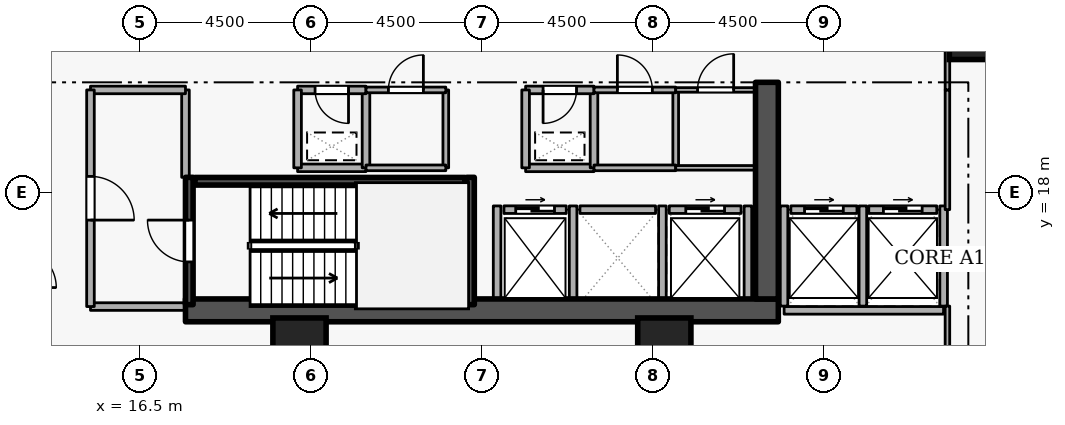
"""IFC4 building model, lengths in metres.
Left out: names, types, materials, properties, quantities, classifications, styles, units other than length and angle.
Written with IfcOpenShell. Run it as: python <this file> out.ifc"""

import sys

from ifc_helpers import new_model, si_unit, direction, frame, frame_2d, origin, origin_2d, place, context, subcontext, project, spatial, rectangle, extrude, element, fill, save


model = new_model("IFC4")
c1 = context("Model", 3, precision=1e-05, world=origin(), true_north=direction((0.0, 1.0)))
c2 = subcontext(c1, "Body", "Model", "MODEL_VIEW")
j1 = project(units=[si_unit("LENGTHUNIT", "METRE"), si_unit("PLANEANGLEUNIT", "RADIAN")], contexts=[c1])
p1 = place(None, origin())
s1 = spatial("IfcSite", under=j1, at=p1, CompositionType="ELEMENT")
p2 = place(p1, origin())
s2 = spatial("IfcBuilding", under=s1, at=p2, CompositionType="ELEMENT")
p3 = place(p2, frame((0.0, 0.0, 38.7)))
s3 = spatial("IfcBuildingStorey", under=s2, at=p3, CompositionType="ELEMENT", Elevation=38.7)
p4 = place(p3, frame((17.7, 14.9, 0.0), z_axis=(0.0, 0.0, 1.0), x_axis=(1.0, 0.0, 0.0)))
e1 = element("IfcWall", 1, at=p4, inside=s3, PredefinedType="SHEAR", context=c2, shape_type="SweptSolid", body=[
    extrude(rectangle(XDim=15.6, YDim=0.6, at=frame_2d((7.8, 0.0))), origin(), (0.0, 0.0, 1.0), 3.6),
])
p5 = place(p3, frame((33.0, 15.2, 0.0), z_axis=(0.0, 0.0, 1.0), x_axis=(0.0, 1.0, 0.0)))
e2 = element("IfcWall", 2, at=p5, inside=s3, PredefinedType="SHEAR", context=c2, shape_type="SweptSolid", body=[
    extrude(rectangle(XDim=5.7, YDim=0.6, at=frame_2d((2.85, 0.0))), origin(), (0.0, 0.0, 1.0), 3.6),
])
for number, where, z_axis, x_axis in (
    (3, (38.5, 22.2, 0.0), (0.0, 0.0, 1.0), (1.0, 0.0, 0.0)),
    (4, (20.7, 14.0, 0.0), (0.0, 0.0, 1.0), (1.0, 0.0, 0.0)),
    (5, (30.3, 14.0, 0.0), (0.0, 0.0, 1.0), (1.0, 0.0, 0.0)),
):
    element("IfcColumn", number, at=place(p3, frame(where, z_axis=z_axis, x_axis=x_axis)), inside=s3, PredefinedType="COLUMN", context=c2, shape_type="SweptSolid", body=[
        extrude(rectangle(XDim=1.4, YDim=1.4, at=origin_2d()), origin(), (0.0, 0.0, 1.0), 3.6),
    ])
p6 = place(p3, frame((26.08, 17.55, 0.0), z_axis=(0.0, 0.0, 1.0), x_axis=(1.0, 0.0, 0.0)))
e6 = element("IfcWall", 6, at=p6, inside=s3, PredefinedType="STANDARD", context=c2, shape_type="SweptSolid", body=[
    extrude(rectangle(XDim=1.64, YDim=0.2, at=frame_2d((0.82, 0.0))), origin(), (0.0, 0.0, 1.0), 3.34),
])
p7 = place(p6, frame((0.31, 0.0, 0.0)))
e7 = element("IfcOpeningElement", 7, at=p7, cuts=e6, PredefinedType="OPENING", context=c2, shape_type="SweptSolid", body=[
    extrude(rectangle(XDim=1.02, YDim=2.06, at=frame_2d((0.51, 1.03))), frame((0.0, 0.11, 0.0), z_axis=(0.0, -1.0, 0.0), x_axis=(1.0, 0.0, 0.0)), (0.0, 0.0, 1.0), 0.22),
])
p8 = place(p3, frame((28.08, 17.55, 0.0), z_axis=(0.0, 0.0, 1.0), x_axis=(1.0, 0.0, 0.0)))
e8 = element("IfcWall", 8, at=p8, inside=s3, PredefinedType="STANDARD", context=c2, shape_type="SweptSolid", body=[
    extrude(rectangle(XDim=1.99, YDim=0.2, at=frame_2d((0.995, 0.0))), origin(), (0.0, 0.0, 1.0), 3.34),
])
p9 = place(p3, frame((30.43, 17.55, 0.0), z_axis=(0.0, 0.0, 1.0), x_axis=(1.0, 0.0, 0.0)))
e9 = element("IfcWall", 9, at=p9, inside=s3, PredefinedType="STANDARD", context=c2, shape_type="SweptSolid", body=[
    extrude(rectangle(XDim=1.89, YDim=0.2, at=frame_2d((0.945, 0.0))), origin(), (0.0, 0.0, 1.0), 3.34),
])
p10 = place(p9, frame((0.435, 0.0, 0.0)))
e10 = element("IfcOpeningElement", 10, at=p10, cuts=e9, PredefinedType="OPENING", context=c2, shape_type="SweptSolid", body=[
    extrude(rectangle(XDim=1.02, YDim=2.06, at=frame_2d((0.51, 1.03))), frame((0.0, 0.11, 0.0), z_axis=(0.0, -1.0, 0.0), x_axis=(1.0, 0.0, 0.0)), (0.0, 0.0, 1.0), 0.22),
])
p11 = place(p3, frame((33.63, 17.55, 0.0), z_axis=(0.0, 0.0, 1.0), x_axis=(1.0, 0.0, 0.0)))
e11 = element("IfcWall", 11, at=p11, inside=s3, PredefinedType="STANDARD", context=c2, shape_type="SweptSolid", body=[
    extrude(rectangle(XDim=1.74, YDim=0.2, at=frame_2d((0.87, 0.0))), origin(), (0.0, 0.0, 1.0), 3.34),
])
p12 = place(p11, frame((0.36, 0.0, 0.0)))
e12 = element("IfcOpeningElement", 12, at=p12, cuts=e11, PredefinedType="OPENING", context=c2, shape_type="SweptSolid", body=[
    extrude(rectangle(XDim=1.02, YDim=2.06, at=frame_2d((0.51, 1.03))), frame((0.0, 0.11, 0.0), z_axis=(0.0, -1.0, 0.0), x_axis=(1.0, 0.0, 0.0)), (0.0, 0.0, 1.0), 0.22),
])
p13 = place(p3, frame((35.68, 17.55, 0.0), z_axis=(0.0, 0.0, 1.0), x_axis=(1.0, 0.0, 0.0)))
e13 = element("IfcWall", 13, at=p13, inside=s3, PredefinedType="STANDARD", context=c2, shape_type="SweptSolid", body=[
    extrude(rectangle(XDim=1.79, YDim=0.2, at=frame_2d((0.895, 0.0))), origin(), (0.0, 0.0, 1.0), 3.34),
])
p14 = place(p13, frame((0.385, 0.0, 0.0)))
e14 = element("IfcOpeningElement", 14, at=p14, cuts=e13, PredefinedType="OPENING", context=c2, shape_type="SweptSolid", body=[
    extrude(rectangle(XDim=1.02, YDim=2.06, at=frame_2d((0.51, 1.03))), frame((0.0, 0.11, 0.0), z_axis=(0.0, -1.0, 0.0), x_axis=(1.0, 0.0, 0.0)), (0.0, 0.0, 1.0), 0.22),
])
for number, where, z_axis, x_axis in (
    (15, (27.9, 15.212, 0.0), (0.0, 0.0, 1.0), (0.0, 1.0, 0.0)),
    (16, (25.9, 15.212, 0.0), (0.0, 0.0, 1.0), (0.0, 1.0, 0.0)),
    (17, (30.25, 15.212, 0.0), (0.0, 0.0, 1.0), (0.0, 1.0, 0.0)),
    (18, (32.5, 15.212, 0.0), (0.0, 0.0, 1.0), (0.0, 1.0, 0.0)),
):
    element("IfcWall", number, at=place(p3, frame(where, z_axis=z_axis, x_axis=x_axis)), inside=s3, PredefinedType="STANDARD", context=c2, shape_type="SweptSolid", body=[
        extrude(rectangle(XDim=2.436, YDim=0.2, at=frame_2d((1.218, 0.0))), origin(), (0.0, 0.0, 1.0), 3.34),
    ])
p15 = place(p3, frame((33.452, 14.9, 0.0), z_axis=(0.0, 0.0, 1.0), x_axis=(1.0, 0.0, 0.0)))
e19 = element("IfcWall", 19, at=p15, inside=s3, PredefinedType="STANDARD", context=c2, shape_type="SweptSolid", body=[
    extrude(rectangle(XDim=4.196, YDim=0.2, at=frame_2d((2.098, 0.0))), origin(), (0.0, 0.0, 1.0), 3.34),
])
for number, where, z_axis, x_axis in (
    (20, (35.525, 15.012, 0.0), (0.0, 0.0, 1.0), (0.0, 1.0, 0.0)),
    (21, (33.45, 15.012, 0.0), (0.0, 0.0, 1.0), (0.0, 1.0, 0.0)),
    (22, (37.65, 15.012, 0.0), (0.0, 0.0, 1.0), (0.0, 1.0, 0.0)),
):
    element("IfcWall", number, at=place(p3, frame(where, z_axis=z_axis, x_axis=x_axis)), inside=s3, PredefinedType="STANDARD", context=c2, shape_type="SweptSolid", body=[
        extrude(rectangle(XDim=2.636, YDim=0.2, at=frame_2d((1.318, 0.0))), origin(), (0.0, 0.0, 1.0), 3.34),
    ])
p16 = place(p3, frame((17.8, 15.05, 0.0), z_axis=(0.0, 0.0, 1.0), x_axis=(0.0, 1.0, 0.0)))
e23 = element("IfcWall", 23, at=p16, inside=s3, PredefinedType="SHEAR", context=c2, shape_type="SweptSolid", body=[
    extrude(rectangle(XDim=3.35, YDim=0.2, at=frame_2d((1.675, 0.0))), origin(), (0.0, 0.0, 1.0), 3.6),
])
p17 = place(p16, frame((1.125, 0.0, 0.0)))
e24 = element("IfcOpeningElement", 24, at=p17, cuts=e23, PredefinedType="OPENING", context=c2, shape_type="SweptSolid", body=[
    extrude(rectangle(XDim=1.1, YDim=2.1, at=frame_2d((0.55, 1.05))), frame((0.0, 0.11, 0.0), z_axis=(0.0, -1.0, 0.0), x_axis=(1.0, 0.0, 0.0)), (0.0, 0.0, 1.0), 0.22),
])
p18 = place(p3, frame((25.2, 18.4, 0.0), z_axis=(0.0, 0.0, 1.0), x_axis=(0.0, -1.0, 0.0)))
e25 = element("IfcWall", 25, at=p18, inside=s3, PredefinedType="SHEAR", context=c2, shape_type="SweptSolid", body=[
    extrude(rectangle(XDim=3.35, YDim=0.2, at=frame_2d((1.675, 0.0))), origin(), (0.0, 0.0, 1.0), 3.6),
])
p19 = place(p3, frame((25.05, 18.297, 0.0), z_axis=(0.0, 0.0, 1.0), x_axis=(-1.0, 0.0, 0.0)))
e26 = element("IfcWall", 26, at=p19, inside=s3, PredefinedType="SHEAR", context=c2, shape_type="SweptSolid", body=[
    extrude(rectangle(XDim=7.1, YDim=0.2, at=frame_2d((3.55, 0.0))), origin(), (0.0, 0.0, 1.0), 3.6),
])
p20 = place(p3, frame((15.2, 15.0, 0.0), z_axis=(0.0, 0.0, 1.0), x_axis=(1.0, 0.0, 0.0)))
e27 = element("IfcWall", 27, at=p20, inside=s3, PredefinedType="STANDARD", context=c2, shape_type="SweptSolid", body=[
    extrude(rectangle(XDim=2.5, YDim=0.2, at=frame_2d((1.25, 0.0))), origin(), (0.0, 0.0, 1.0), 3.34),
])
p21 = place(p3, frame((17.7, 18.4, 0.0), z_axis=(0.0, 0.0, 1.0), x_axis=(0.0, 1.0, 0.0)))
e28 = element("IfcWall", 28, at=p21, inside=s3, PredefinedType="STANDARD", context=c2, shape_type="SweptSolid", body=[
    extrude(rectangle(XDim=2.3, YDim=0.2, at=frame_2d((1.15, 0.0))), origin(), (0.0, 0.0, 1.0), 2.545),
])
p22 = place(p3, frame((17.7, 20.7, 0.0), z_axis=(0.0, 0.0, 1.0), x_axis=(-1.0, 0.0, 0.0)))
e29 = element("IfcWall", 29, at=p22, inside=s3, PredefinedType="STANDARD", context=c2, shape_type="SweptSolid", body=[
    extrude(rectangle(XDim=2.5, YDim=0.2, at=frame_2d((1.25, 0.0))), origin(), (0.0, 0.0, 1.0), 3.34),
])
p23 = place(p3, frame((15.2, 20.7, 0.0), z_axis=(0.0, 0.0, 1.0), x_axis=(0.0, -1.0, 0.0)))
e30 = element("IfcWall", 30, at=p23, inside=s3, PredefinedType="STANDARD", context=c2, shape_type="SweptSolid", body=[
    extrude(rectangle(XDim=5.7, YDim=0.2, at=frame_2d((2.85, 0.0))), origin(), (0.0, 0.0, 1.0), 3.34),
])
p24 = place(p23, frame((2.275, 0.0, 0.0)))
e31 = element("IfcOpeningElement", 31, at=p24, cuts=e30, PredefinedType="OPENING", context=c2, shape_type="SweptSolid", body=[
    extrude(rectangle(XDim=1.15, YDim=2.1, at=frame_2d((0.575, 1.05))), frame((0.0, 0.11, 0.0), z_axis=(0.0, -1.0, 0.0), x_axis=(1.0, 0.0, 0.0)), (0.0, 0.0, 1.0), 0.22),
])
p25 = place(p3, frame((26.65, 18.65, 0.0), z_axis=(0.0, 0.0, 1.0), x_axis=(1.0, 0.0, 0.0)))
e32 = element("IfcWall", 32, at=p25, inside=s3, PredefinedType="STANDARD", context=c2, shape_type="SweptSolid", body=[
    extrude(rectangle(XDim=1.8, YDim=0.2, at=frame_2d((0.9, 0.0))), origin(), (0.0, 0.0, 1.0), 3.34),
])
p26 = place(p3, frame((28.45, 18.65, 0.0), z_axis=(0.0, 0.0, 1.0), x_axis=(0.0, 1.0, 0.0)))
e33 = element("IfcWall", 33, at=p26, inside=s3, PredefinedType="STANDARD", context=c2, shape_type="SweptSolid", body=[
    extrude(rectangle(XDim=2.05, YDim=0.2, at=frame_2d((1.025, 0.0))), origin(), (0.0, 0.0, 1.0), 3.34),
])
p27 = place(p3, frame((28.45, 20.7, 0.0), z_axis=(0.0, 0.0, 1.0), x_axis=(-1.0, 0.0, 0.0)))
e34 = element("IfcWall", 34, at=p27, inside=s3, PredefinedType="STANDARD", context=c2, shape_type="SweptSolid", body=[
    extrude(rectangle(XDim=1.8, YDim=0.2, at=frame_2d((0.9, 0.0))), origin(), (0.0, 0.0, 1.0), 3.34),
])
p28 = place(p27, frame((0.46, 0.0, 0.0)))
e35 = element("IfcOpeningElement", 35, at=p28, cuts=e34, PredefinedType="OPENING", context=c2, shape_type="SweptSolid", body=[
    extrude(rectangle(XDim=0.88, YDim=2.04, at=frame_2d((0.44, 1.02))), frame((0.0, 0.11, 0.0), z_axis=(0.0, -1.0, 0.0), x_axis=(1.0, 0.0, 0.0)), (0.0, 0.0, 1.0), 0.22),
])
p29 = place(p3, frame((26.65, 20.7, 0.0), z_axis=(0.0, 0.0, 1.0), x_axis=(0.0, -1.0, 0.0)))
e36 = element("IfcWall", 36, at=p29, inside=s3, PredefinedType="STANDARD", context=c2, shape_type="SweptSolid", body=[
    extrude(rectangle(XDim=2.05, YDim=0.2, at=frame_2d((1.025, 0.0))), origin(), (0.0, 0.0, 1.0), 3.34),
])
p30 = place(p3, frame((20.65, 18.65, 0.0), z_axis=(0.0, 0.0, 1.0), x_axis=(1.0, 0.0, 0.0)))
e37 = element("IfcWall", 37, at=p30, inside=s3, PredefinedType="STANDARD", context=c2, shape_type="SweptSolid", body=[
    extrude(rectangle(XDim=1.8, YDim=0.2, at=frame_2d((0.9, 0.0))), origin(), (0.0, 0.0, 1.0), 3.34),
])
p31 = place(p3, frame((22.45, 18.65, 0.0), z_axis=(0.0, 0.0, 1.0), x_axis=(0.0, 1.0, 0.0)))
e38 = element("IfcWall", 38, at=p31, inside=s3, PredefinedType="STANDARD", context=c2, shape_type="SweptSolid", body=[
    extrude(rectangle(XDim=2.05, YDim=0.2, at=frame_2d((1.025, 0.0))), origin(), (0.0, 0.0, 1.0), 3.34),
])
p32 = place(p3, frame((22.45, 20.7, 0.0), z_axis=(0.0, 0.0, 1.0), x_axis=(-1.0, 0.0, 0.0)))
e39 = element("IfcWall", 39, at=p32, inside=s3, PredefinedType="STANDARD", context=c2, shape_type="SweptSolid", body=[
    extrude(rectangle(XDim=1.8, YDim=0.2, at=frame_2d((0.9, 0.0))), origin(), (0.0, 0.0, 1.0), 3.34),
])
p33 = place(p32, frame((0.46, 0.0, 0.0)))
e40 = element("IfcOpeningElement", 40, at=p33, cuts=e39, PredefinedType="OPENING", context=c2, shape_type="SweptSolid", body=[
    extrude(rectangle(XDim=0.88, YDim=2.04, at=frame_2d((0.44, 1.02))), frame((0.0, 0.11, 0.0), z_axis=(0.0, -1.0, 0.0), x_axis=(1.0, 0.0, 0.0)), (0.0, 0.0, 1.0), 0.22),
])
p34 = place(p3, frame((20.65, 20.7, 0.0), z_axis=(0.0, 0.0, 1.0), x_axis=(0.0, -1.0, 0.0)))
e41 = element("IfcWall", 41, at=p34, inside=s3, PredefinedType="STANDARD", context=c2, shape_type="SweptSolid", body=[
    extrude(rectangle(XDim=2.05, YDim=0.2, at=frame_2d((1.025, 0.0))), origin(), (0.0, 0.0, 1.0), 3.34),
])
p35 = place(p3, frame((24.55, 20.7, 0.0), z_axis=(0.0, 0.0, 1.0), x_axis=(0.0, -1.0, 0.0)))
e42 = element("IfcWall", 42, at=p35, inside=s3, PredefinedType="PARTITIONING", context=c2, shape_type="SweptSolid", body=[
    extrude(rectangle(XDim=2.05, YDim=0.15, at=frame_2d((1.025, 0.0))), origin(), (0.0, 0.0, 1.0), 3.34),
])
p36 = place(p3, frame((24.55, 18.65, 0.0), z_axis=(0.0, 0.0, 1.0), x_axis=(-1.0, 0.0, 0.0)))
e43 = element("IfcWall", 43, at=p36, inside=s3, PredefinedType="PARTITIONING", context=c2, shape_type="SweptSolid", body=[
    extrude(rectangle(XDim=2.1, YDim=0.15, at=frame_2d((1.05, 0.0))), origin(), (0.0, 0.0, 1.0), 3.34),
])
p37 = place(p3, frame((22.45, 20.7, 0.0), z_axis=(0.0, 0.0, 1.0), x_axis=(1.0, 0.0, 0.0)))
e44 = element("IfcWall", 44, at=p37, inside=s3, PredefinedType="PARTITIONING", context=c2, shape_type="SweptSolid", body=[
    extrude(rectangle(XDim=2.1, YDim=0.15, at=frame_2d((1.05, 0.0))), origin(), (0.0, 0.0, 1.0), 3.34),
])
p38 = place(p37, frame((0.59, 0.0, 0.0)))
e45 = element("IfcOpeningElement", 45, at=p38, cuts=e44, PredefinedType="OPENING", context=c2, shape_type="SweptSolid", body=[
    extrude(rectangle(XDim=0.92, YDim=2.08, at=frame_2d((0.46, 1.04))), frame((0.0, 0.085, 0.0), z_axis=(0.0, -1.0, 0.0), x_axis=(1.0, 0.0, 0.0)), (0.0, 0.0, 1.0), 0.17),
])
p39 = place(p3, frame((30.6, 20.7, 0.0), z_axis=(0.0, 0.0, 1.0), x_axis=(0.0, -1.0, 0.0)))
e46 = element("IfcWall", 46, at=p39, inside=s3, PredefinedType="PARTITIONING", context=c2, shape_type="SweptSolid", body=[
    extrude(rectangle(XDim=2.05, YDim=0.15, at=frame_2d((1.025, 0.0))), origin(), (0.0, 0.0, 1.0), 3.34),
])
p40 = place(p3, frame((30.6, 18.65, 0.0), z_axis=(0.0, 0.0, 1.0), x_axis=(-1.0, 0.0, 0.0)))
e47 = element("IfcWall", 47, at=p40, inside=s3, PredefinedType="PARTITIONING", context=c2, shape_type="SweptSolid", body=[
    extrude(rectangle(XDim=2.15, YDim=0.15, at=frame_2d((1.075, 0.0))), origin(), (0.0, 0.0, 1.0), 3.34),
])
p41 = place(p3, frame((28.45, 20.7, 0.0), z_axis=(0.0, 0.0, 1.0), x_axis=(1.0, 0.0, 0.0)))
e48 = element("IfcWall", 48, at=p41, inside=s3, PredefinedType="PARTITIONING", context=c2, shape_type="SweptSolid", body=[
    extrude(rectangle(XDim=2.15, YDim=0.15, at=frame_2d((1.075, 0.0))), origin(), (0.0, 0.0, 1.0), 3.34),
])
p42 = place(p41, frame((0.615, 0.0, 0.0)))
e49 = element("IfcOpeningElement", 49, at=p42, cuts=e48, PredefinedType="OPENING", context=c2, shape_type="SweptSolid", body=[
    extrude(rectangle(XDim=0.92, YDim=2.08, at=frame_2d((0.46, 1.04))), frame((0.0, 0.085, 0.0), z_axis=(0.0, -1.0, 0.0), x_axis=(1.0, 0.0, 0.0)), (0.0, 0.0, 1.0), 0.17),
])
p43 = place(p3, frame((32.7, 18.65, 0.0), z_axis=(0.0, 0.0, 1.0), x_axis=(-1.0, 0.0, 0.0)))
e50 = element("IfcWall", 50, at=p43, inside=s3, PredefinedType="PARTITIONING", context=c2, shape_type="SweptSolid", body=[
    extrude(rectangle(XDim=2.1, YDim=0.12, at=frame_2d((1.05, 0.0))), origin(), (0.0, 0.0, 1.0), 3.34),
])
p44 = place(p3, frame((30.6, 20.7, 0.0), z_axis=(0.0, 0.0, 1.0), x_axis=(1.0, 0.0, 0.0)))
e51 = element("IfcWall", 51, at=p44, inside=s3, PredefinedType="PARTITIONING", context=c2, shape_type="SweptSolid", body=[
    extrude(rectangle(XDim=2.1, YDim=0.12, at=frame_2d((1.05, 0.0))), origin(), (0.0, 0.0, 1.0), 3.34),
])
p45 = place(p44, frame((0.575, 0.0, 0.0)))
e52 = element("IfcOpeningElement", 52, at=p45, cuts=e51, PredefinedType="OPENING", context=c2, shape_type="SweptSolid", body=[
    extrude(rectangle(XDim=0.95, YDim=2.1, at=frame_2d((0.475, 1.05))), frame((0.0, 0.07, 0.0), z_axis=(0.0, -1.0, 0.0), x_axis=(1.0, 0.0, 0.0)), (0.0, 0.0, 1.0), 0.14),
])
p46 = place(p3, frame((37.75, 17.55, 0.0), z_axis=(0.0, 0.0, 1.0), x_axis=(0.0, 1.0, 0.0)))
e53 = element("IfcWall", 53, at=p46, inside=s3, PredefinedType="PARTITIONING", context=c2, shape_type="SweptSolid", body=[
    extrude(rectangle(XDim=3.15, YDim=0.12, at=frame_2d((1.575, 0.0))), origin(), (0.0, 0.0, 1.0), 3.34),
])
p47 = place(p3, frame((37.75, 20.7, 0.0), z_axis=(0.0, 0.0, 1.0), x_axis=(0.0, 1.0, 0.0)))
e54 = element("IfcWall", 54, at=p47, inside=s3, PredefinedType="PARTITIONING", context=c2, shape_type="SweptSolid", body=[
    extrude(rectangle(XDim=1.85, YDim=0.12, at=frame_2d((0.925, 0.0))), origin(), (0.0, 0.0, 1.0), 3.34),
])
p48 = place(p3, frame((37.75, 13.15, 0.0), z_axis=(0.0, 0.0, 1.0), x_axis=(0.0, 1.0, 0.0)))
e55 = element("IfcWall", 55, at=p48, inside=s3, PredefinedType="PARTITIONING", context=c2, shape_type="SweptSolid", body=[
    extrude(rectangle(XDim=1.862, YDim=0.12, at=frame_2d((0.931, 0.0))), origin(), (0.0, 0.0, 1.0), 3.34),
])
p49 = place(p7, origin())
e56 = element("IfcDoor", 56, at=p49, inside=s3, OperationType="SLIDING_TO_LEFT", PredefinedType="DOOR", context=c2, shape_type="SweptSolid", body=[
    extrude(rectangle(XDim=1.02, YDim=2.06, at=frame_2d((0.51, 1.03))), frame((0.0, 0.025, 0.0), z_axis=(0.0, -1.0, 0.0), x_axis=(1.0, 0.0, 0.0)), (0.0, 0.0, 1.0), 0.05),
])
fill(e7, e56)
p50 = place(p10, origin())
e57 = element("IfcDoor", 57, at=p50, inside=s3, OperationType="SLIDING_TO_LEFT", PredefinedType="DOOR", context=c2, shape_type="SweptSolid", body=[
    extrude(rectangle(XDim=1.02, YDim=2.06, at=frame_2d((0.51, 1.03))), frame((0.0, 0.025, 0.0), z_axis=(0.0, -1.0, 0.0), x_axis=(1.0, 0.0, 0.0)), (0.0, 0.0, 1.0), 0.05),
])
fill(e10, e57)
p51 = place(p12, origin())
e58 = element("IfcDoor", 58, at=p51, inside=s3, OperationType="SLIDING_TO_LEFT", PredefinedType="DOOR", context=c2, shape_type="SweptSolid", body=[
    extrude(rectangle(XDim=1.02, YDim=2.06, at=frame_2d((0.51, 1.03))), frame((0.0, 0.025, 0.0), z_axis=(0.0, -1.0, 0.0), x_axis=(1.0, 0.0, 0.0)), (0.0, 0.0, 1.0), 0.05),
])
fill(e12, e58)
p52 = place(p14, origin())
e59 = element("IfcDoor", 59, at=p52, inside=s3, OperationType="SLIDING_TO_LEFT", PredefinedType="DOOR", context=c2, shape_type="SweptSolid", body=[
    extrude(rectangle(XDim=1.02, YDim=2.06, at=frame_2d((0.51, 1.03))), frame((0.0, 0.025, 0.0), z_axis=(0.0, -1.0, 0.0), x_axis=(1.0, 0.0, 0.0)), (0.0, 0.0, 1.0), 0.05),
])
fill(e14, e59)
p53 = place(p17, origin())
e60 = element("IfcDoor", 60, at=p53, inside=s3, OperationType="SINGLE_SWING_RIGHT", PredefinedType="DOOR", context=c2, shape_type="SweptSolid", body=[
    extrude(rectangle(XDim=1.1, YDim=2.1, at=frame_2d((0.55, 1.05))), frame((0.0, 0.025, 0.0), z_axis=(0.0, -1.0, 0.0), x_axis=(1.0, 0.0, 0.0)), (0.0, 0.0, 1.0), 0.05),
])
fill(e24, e60)
p54 = place(p24, origin())
e61 = element("IfcDoor", 61, at=p54, inside=s3, OperationType="SINGLE_SWING_RIGHT", PredefinedType="DOOR", context=c2, shape_type="SweptSolid", body=[
    extrude(rectangle(XDim=1.15, YDim=2.1, at=frame_2d((0.575, 1.05))), frame((0.0, 0.025, 0.0), z_axis=(0.0, -1.0, 0.0), x_axis=(1.0, 0.0, 0.0)), (0.0, 0.0, 1.0), 0.05),
])
fill(e31, e61)
p55 = place(p28, origin())
e62 = element("IfcDoor", 62, at=p55, inside=s3, OperationType="SINGLE_SWING_RIGHT", PredefinedType="DOOR", context=c2, shape_type="SweptSolid", body=[
    extrude(rectangle(XDim=0.88, YDim=2.04, at=frame_2d((0.44, 1.02))), frame((0.0, 0.025, 0.0), z_axis=(0.0, -1.0, 0.0), x_axis=(1.0, 0.0, 0.0)), (0.0, 0.0, 1.0), 0.05),
])
fill(e35, e62)
p56 = place(p33, origin())
e63 = element("IfcDoor", 63, at=p56, inside=s3, OperationType="SINGLE_SWING_LEFT", PredefinedType="DOOR", context=c2, shape_type="SweptSolid", body=[
    extrude(rectangle(XDim=0.88, YDim=2.04, at=frame_2d((0.44, 1.02))), frame((0.0, 0.025, 0.0), z_axis=(0.0, -1.0, 0.0), x_axis=(1.0, 0.0, 0.0)), (0.0, 0.0, 1.0), 0.05),
])
fill(e40, e63)
p57 = place(p38, origin())
e64 = element("IfcDoor", 64, at=p57, inside=s3, OperationType="SINGLE_SWING_RIGHT", PredefinedType="DOOR", context=c2, shape_type="SweptSolid", body=[
    extrude(rectangle(XDim=0.92, YDim=2.08, at=frame_2d((0.46, 1.04))), frame((0.0, 0.025, 0.0), z_axis=(0.0, -1.0, 0.0), x_axis=(1.0, 0.0, 0.0)), (0.0, 0.0, 1.0), 0.05),
])
fill(e45, e64)
p58 = place(p42, origin())
e65 = element("IfcDoor", 65, at=p58, inside=s3, OperationType="SINGLE_SWING_LEFT", PredefinedType="DOOR", context=c2, shape_type="SweptSolid", body=[
    extrude(rectangle(XDim=0.92, YDim=2.08, at=frame_2d((0.46, 1.04))), frame((0.0, 0.025, 0.0), z_axis=(0.0, -1.0, 0.0), x_axis=(1.0, 0.0, 0.0)), (0.0, 0.0, 1.0), 0.05),
])
fill(e49, e65)
p59 = place(p45, origin())
e66 = element("IfcDoor", 66, at=p59, inside=s3, OperationType="SINGLE_SWING_RIGHT", PredefinedType="DOOR", context=c2, shape_type="SweptSolid", body=[
    extrude(rectangle(XDim=0.95, YDim=2.1, at=frame_2d((0.475, 1.05))), frame((0.0, 0.025, 0.0), z_axis=(0.0, -1.0, 0.0), x_axis=(1.0, 0.0, 0.0)), (0.0, 0.0, 1.0), 0.05),
])
fill(e52, e66)
save(model, sys.argv[1])
